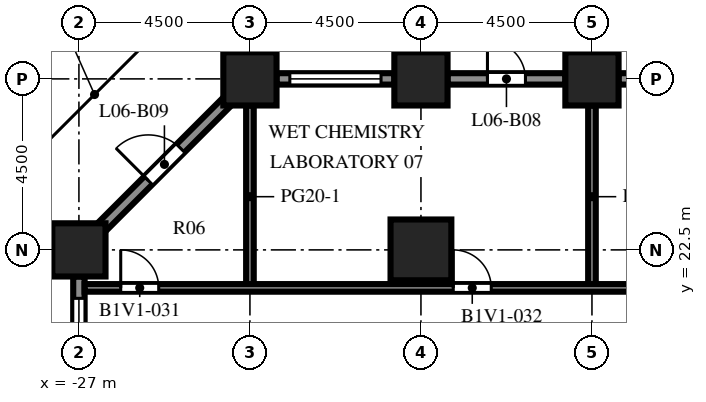
"""IFC4 building model, lengths in metres.
Left out: names, types, materials, properties, quantities, classifications, styles, units other than length and angle.
Written with IfcOpenShell. Run it as: python <this file> out.ifc"""

import sys

from ifc_helpers import new_model, si_unit, direction, frame, frame_2d, origin, origin_2d, place, context, subcontext, project, spatial, rectangle, extrude, element, fill, save


model = new_model("IFC4")
c1 = context("Model", 3, precision=1e-05, world=origin(), true_north=direction((0.0, 1.0)))
c2 = subcontext(c1, "Body", "Model", "MODEL_VIEW")
j1 = project(units=[si_unit("LENGTHUNIT", "METRE"), si_unit("PLANEANGLEUNIT", "RADIAN")], contexts=[c1])
p1 = place(None, origin())
s1 = spatial("IfcSite", under=j1, at=p1, CompositionType="ELEMENT")
p2 = place(p1, origin())
s2 = spatial("IfcBuilding", under=s1, at=p2, CompositionType="ELEMENT")
p3 = place(p2, frame((0.0, 0.0, 27.7)))
s3 = spatial("IfcBuildingStorey", under=s2, at=p3, CompositionType="ELEMENT", Elevation=27.7)
for number, where, z_axis, x_axis in (
    (1, (-27.0, 22.5, 0.0), (0.0, 0.0, 1.0), (1.0, 0.0, 0.0)),
    (2, (-22.5, 27.0, 0.0), (0.0, 0.0, 1.0), (1.0, 0.0, 0.0)),
    (3, (-18.0, 27.0, 0.0), (0.0, 0.0, 1.0), (1.0, 0.0, 0.0)),
    (4, (-13.5, 27.0, 0.0), (0.0, 0.0, 1.0), (1.0, 0.0, 0.0)),
):
    element("IfcColumn", number, at=place(p3, frame(where, z_axis=z_axis, x_axis=x_axis)), inside=s3, PredefinedType="COLUMN", context=c2, shape_type="SweptSolid", body=[
        extrude(rectangle(XDim=1.4, YDim=1.4, at=origin_2d()), origin(), (0.0, 0.0, 1.0), 4.1),
    ])
p4 = place(p3, frame((-18.0, 22.5, 0.0), z_axis=(0.0, 0.0, 1.0), x_axis=(1.0, 0.0, 0.0)))
e5 = element("IfcColumn", 5, at=p4, inside=s3, PredefinedType="COLUMN", context=c2, shape_type="SweptSolid", body=[
    extrude(rectangle(XDim=1.6, YDim=1.6, at=origin_2d()), origin(), (0.0, 0.0, 1.0), 4.1),
])
p5 = place(p3, frame((-12.8, 27.0, 0.0), z_axis=(0.0, 0.0, 1.0), x_axis=(1.0, 0.0, 0.0)))
e6 = element("IfcWall", 6, at=p5, inside=s3, PredefinedType="SOLIDWALL", context=c2, shape_type="SweptSolid", body=[
    extrude(rectangle(XDim=3.1, YDim=0.3, at=frame_2d((1.55, 0.0))), origin(), (0.0, 0.0, 1.0), 2.75),
])
p6 = place(p5, frame((0.35, 0.0, 0.8)))
e7 = element("IfcOpeningElement", 7, at=p6, cuts=e6, PredefinedType="OPENING", context=c2, shape_type="SweptSolid", body=[
    extrude(rectangle(XDim=2.4, YDim=1.7, at=frame_2d((1.2, 0.85))), frame((0.0, 0.16, 0.0), z_axis=(0.0, -1.0, 0.0), x_axis=(1.0, 0.0, 0.0)), (0.0, 0.0, 1.0), 0.32),
])
p7 = place(p3, frame((-17.3, 27.0, 0.0), z_axis=(0.0, 0.0, 1.0), x_axis=(1.0, 0.0, 0.0)))
e8 = element("IfcWall", 8, at=p7, inside=s3, PredefinedType="SOLIDWALL", context=c2, shape_type="SweptSolid", body=[
    extrude(rectangle(XDim=3.1, YDim=0.3, at=frame_2d((1.55, 0.0))), origin(), (0.0, 0.0, 1.0), 2.75),
])
p8 = place(p7, frame((1.05, 0.0, 0.0)))
e9 = element("IfcOpeningElement", 9, at=p8, cuts=e8, PredefinedType="OPENING", context=c2, shape_type="SweptSolid", body=[
    extrude(rectangle(XDim=1.0, YDim=2.2, at=frame_2d((0.5, 1.1))), frame((0.0, 0.16, 0.0), z_axis=(0.0, -1.0, 0.0), x_axis=(1.0, 0.0, 0.0)), (0.0, 0.0, 1.0), 0.32),
])
p9 = place(p3, frame((-21.8, 27.0, 0.0), z_axis=(0.0, 0.0, 1.0), x_axis=(1.0, 0.0, 0.0)))
e10 = element("IfcWall", 10, at=p9, inside=s3, PredefinedType="SOLIDWALL", context=c2, shape_type="SweptSolid", body=[
    extrude(rectangle(XDim=3.1, YDim=0.3, at=frame_2d((1.55, 0.0))), origin(), (0.0, 0.0, 1.0), 2.75),
])
p10 = place(p9, frame((0.35, 0.0, 0.8)))
e11 = element("IfcOpeningElement", 11, at=p10, cuts=e10, PredefinedType="OPENING", context=c2, shape_type="SweptSolid", body=[
    extrude(rectangle(XDim=2.4, YDim=1.7, at=frame_2d((1.2, 0.85))), frame((0.0, 0.16, 0.0), z_axis=(0.0, -1.0, 0.0), x_axis=(1.0, 0.0, 0.0)), (0.0, 0.0, 1.0), 0.32),
])
p11 = place(p3, frame((-26.406, 23.094, 0.0), z_axis=(0.0, 0.0, 1.0), x_axis=(0.707106781187, 0.707106781187, 0.0)))
e12 = element("IfcWall", 12, at=p11, inside=s3, PredefinedType="SOLIDWALL", context=c2, shape_type="SweptSolid", body=[
    extrude(rectangle(XDim=4.684, YDim=0.3, at=frame_2d((2.342, 0.0))), origin(), (0.0, 0.0, 1.0), 2.75),
])
p12 = place(p11, frame((1.742, 0.0, 0.0)))
e13 = element("IfcOpeningElement", 13, at=p12, cuts=e12, PredefinedType="OPENING", context=c2, shape_type="SweptSolid", body=[
    extrude(rectangle(XDim=1.2, YDim=2.2, at=frame_2d((0.6, 1.1))), frame((0.0, 0.16, 0.0), z_axis=(0.0, -1.0, 0.0), x_axis=(1.0, 0.0, 0.0)), (0.0, 0.0, 1.0), 0.32),
])
p13 = place(p3, frame((-27.0, 18.7, 0.0), z_axis=(0.0, 0.0, 1.0), x_axis=(0.0, 1.0, 0.0)))
e14 = element("IfcWall", 14, at=p13, inside=s3, PredefinedType="SOLIDWALL", context=c2, shape_type="SweptSolid", body=[
    extrude(rectangle(XDim=3.1, YDim=0.3, at=frame_2d((1.55, 0.0))), origin(), (0.0, 0.0, 1.0), 2.75),
])
p14 = place(p13, frame((0.125, 0.0, 0.8)))
e15 = element("IfcOpeningElement", 15, at=p14, cuts=e14, PredefinedType="OPENING", context=c2, shape_type="SweptSolid", body=[
    extrude(rectangle(XDim=2.4, YDim=1.7, at=frame_2d((1.2, 0.85))), frame((0.0, 0.16, 0.0), z_axis=(0.0, -1.0, 0.0), x_axis=(1.0, 0.0, 0.0)), (0.0, 0.0, 1.0), 0.32),
])
for number, where, z_axis, x_axis in (
    (16, (-22.5, 21.5, 0.0), (0.0, 0.0, 1.0), (0.0, 1.0, 0.0)),
    (17, (-13.5, 21.5, 0.0), (0.0, 0.0, 1.0), (0.0, 1.0, 0.0)),
):
    element("IfcWall", number, at=place(p3, frame(where, z_axis=z_axis, x_axis=x_axis)), inside=s3, PredefinedType="PARTITIONING", context=c2, shape_type="SweptSolid", body=[
        extrude(rectangle(XDim=4.8, YDim=0.2, at=frame_2d((2.4, 0.0))), origin(), (0.0, 0.0, 1.0), 3.65),
    ])
p15 = place(p3, frame((-26.85, 21.5, 0.0), z_axis=(0.0, 0.0, 1.0), x_axis=(1.0, 0.0, 0.0)))
e18 = element("IfcWall", 18, at=p15, inside=s3, PredefinedType="PARTITIONING", context=c2, shape_type="SweptSolid", body=[
    extrude(rectangle(XDim=53.7, YDim=0.2, at=frame_2d((26.85, 0.0))), origin(), (0.0, 0.0, 1.0), 3.65),
])
p16 = place(p15, frame((0.95, 0.0, 0.0)))
e19 = element("IfcOpeningElement", 19, at=p16, cuts=e18, PredefinedType="OPENING", context=c2, shape_type="SweptSolid", body=[
    extrude(rectangle(XDim=1.0, YDim=2.1, at=frame_2d((0.5, 1.05))), frame((0.0, 0.11, 0.0), z_axis=(0.0, -1.0, 0.0), x_axis=(1.0, 0.0, 0.0)), (0.0, 0.0, 1.0), 0.22),
])
p17 = place(p15, frame((9.7, 0.0, 0.0)))
e20 = element("IfcOpeningElement", 20, at=p17, cuts=e18, PredefinedType="OPENING", context=c2, shape_type="SweptSolid", body=[
    extrude(rectangle(XDim=1.0, YDim=2.1, at=frame_2d((0.5, 1.05))), frame((0.0, 0.11, 0.0), z_axis=(0.0, -1.0, 0.0), x_axis=(1.0, 0.0, 0.0)), (0.0, 0.0, 1.0), 0.22),
])
p18 = place(p15, frame((15.2, 0.0, 0.0)))
e21 = element("IfcOpeningElement", 21, at=p18, cuts=e18, PredefinedType="OPENING", context=c2, shape_type="SweptSolid", body=[
    extrude(rectangle(XDim=1.0, YDim=2.1, at=frame_2d((0.5, 1.05))), frame((0.0, 0.11, 0.0), z_axis=(0.0, -1.0, 0.0), x_axis=(1.0, 0.0, 0.0)), (0.0, 0.0, 1.0), 0.22),
])
p19 = place(p15, frame((24.95, 0.0, 0.0)))
e22 = element("IfcOpeningElement", 22, at=p19, cuts=e18, PredefinedType="OPENING", context=c2, shape_type="SweptSolid", body=[
    extrude(rectangle(XDim=1.0, YDim=2.1, at=frame_2d((0.5, 1.05))), frame((0.0, 0.11, 0.0), z_axis=(0.0, -1.0, 0.0), x_axis=(1.0, 0.0, 0.0)), (0.0, 0.0, 1.0), 0.22),
])
p20 = place(p15, frame((32.95, 0.0, 0.0)))
e23 = element("IfcOpeningElement", 23, at=p20, cuts=e18, PredefinedType="OPENING", context=c2, shape_type="SweptSolid", body=[
    extrude(rectangle(XDim=1.0, YDim=2.1, at=frame_2d((0.5, 1.05))), frame((0.0, 0.11, 0.0), z_axis=(0.0, -1.0, 0.0), x_axis=(1.0, 0.0, 0.0)), (0.0, 0.0, 1.0), 0.22),
])
p21 = place(p15, frame((38.7, 0.0, 0.0)))
e24 = element("IfcOpeningElement", 24, at=p21, cuts=e18, PredefinedType="OPENING", context=c2, shape_type="SweptSolid", body=[
    extrude(rectangle(XDim=1.0, YDim=2.1, at=frame_2d((0.5, 1.05))), frame((0.0, 0.11, 0.0), z_axis=(0.0, -1.0, 0.0), x_axis=(1.0, 0.0, 0.0)), (0.0, 0.0, 1.0), 0.22),
])
p22 = place(p15, frame((45.95, 0.0, 0.0)))
e25 = element("IfcOpeningElement", 25, at=p22, cuts=e18, PredefinedType="OPENING", context=c2, shape_type="SweptSolid", body=[
    extrude(rectangle(XDim=1.0, YDim=2.1, at=frame_2d((0.5, 1.05))), frame((0.0, 0.11, 0.0), z_axis=(0.0, -1.0, 0.0), x_axis=(1.0, 0.0, 0.0)), (0.0, 0.0, 1.0), 0.22),
])
p23 = place(p15, frame((50.7, 0.0, 0.0)))
e26 = element("IfcOpeningElement", 26, at=p23, cuts=e18, PredefinedType="OPENING", context=c2, shape_type="SweptSolid", body=[
    extrude(rectangle(XDim=1.0, YDim=2.1, at=frame_2d((0.5, 1.05))), frame((0.0, 0.11, 0.0), z_axis=(0.0, -1.0, 0.0), x_axis=(1.0, 0.0, 0.0)), (0.0, 0.0, 1.0), 0.22),
])
p24 = place(p8, origin())
e27 = element("IfcDoor", 27, at=p24, inside=s3, OperationType="SINGLE_SWING_LEFT", PredefinedType="DOOR", context=c2, shape_type="SweptSolid", body=[
    extrude(rectangle(XDim=1.0, YDim=2.2, at=frame_2d((0.5, 1.1))), frame((0.0, 0.025, 0.0), z_axis=(0.0, -1.0, 0.0), x_axis=(1.0, 0.0, 0.0)), (0.0, 0.0, 1.0), 0.05),
])
fill(e9, e27)
p25 = place(p10, origin())
e28 = element("IfcWindow", 28, at=p25, inside=s3, PartitioningType="SINGLE_PANEL", PredefinedType="WINDOW", context=c2, shape_type="SweptSolid", body=[
    extrude(rectangle(XDim=2.4, YDim=1.7, at=frame_2d((1.2, 0.85))), frame((0.0, 0.03, 0.0), z_axis=(0.0, -1.0, 0.0), x_axis=(1.0, 0.0, 0.0)), (0.0, 0.0, 1.0), 0.06),
])
fill(e11, e28)
p26 = place(p12, origin())
e29 = element("IfcDoor", 29, at=p26, inside=s3, OperationType="SINGLE_SWING_LEFT", PredefinedType="DOOR", context=c2, shape_type="SweptSolid", body=[
    extrude(rectangle(XDim=1.2, YDim=2.2, at=frame_2d((0.6, 1.1))), frame((0.0, 0.025, 0.0), z_axis=(0.0, -1.0, 0.0), x_axis=(1.0, 0.0, 0.0)), (0.0, 0.0, 1.0), 0.05),
])
fill(e13, e29)
p27 = place(p14, origin())
e30 = element("IfcWindow", 30, at=p27, inside=s3, PartitioningType="SINGLE_PANEL", PredefinedType="WINDOW", context=c2, shape_type="SweptSolid", body=[
    extrude(rectangle(XDim=2.4, YDim=1.7, at=frame_2d((1.2, 0.85))), frame((0.0, 0.03, 0.0), z_axis=(0.0, -1.0, 0.0), x_axis=(1.0, 0.0, 0.0)), (0.0, 0.0, 1.0), 0.06),
])
fill(e15, e30)
p28 = place(p16, origin())
e31 = element("IfcDoor", 31, at=p28, inside=s3, OperationType="SINGLE_SWING_LEFT", PredefinedType="DOOR", context=c2, shape_type="SweptSolid", body=[
    extrude(rectangle(XDim=1.0, YDim=2.1, at=frame_2d((0.5, 1.05))), frame((0.0, 0.025, 0.0), z_axis=(0.0, -1.0, 0.0), x_axis=(1.0, 0.0, 0.0)), (0.0, 0.0, 1.0), 0.05),
])
fill(e19, e31)
p29 = place(p17, origin())
e32 = element("IfcDoor", 32, at=p29, inside=s3, OperationType="SINGLE_SWING_LEFT", PredefinedType="DOOR", context=c2, shape_type="SweptSolid", body=[
    extrude(rectangle(XDim=1.0, YDim=2.1, at=frame_2d((0.5, 1.05))), frame((0.0, 0.025, 0.0), z_axis=(0.0, -1.0, 0.0), x_axis=(1.0, 0.0, 0.0)), (0.0, 0.0, 1.0), 0.05),
])
fill(e20, e32)
save(model, sys.argv[1])
